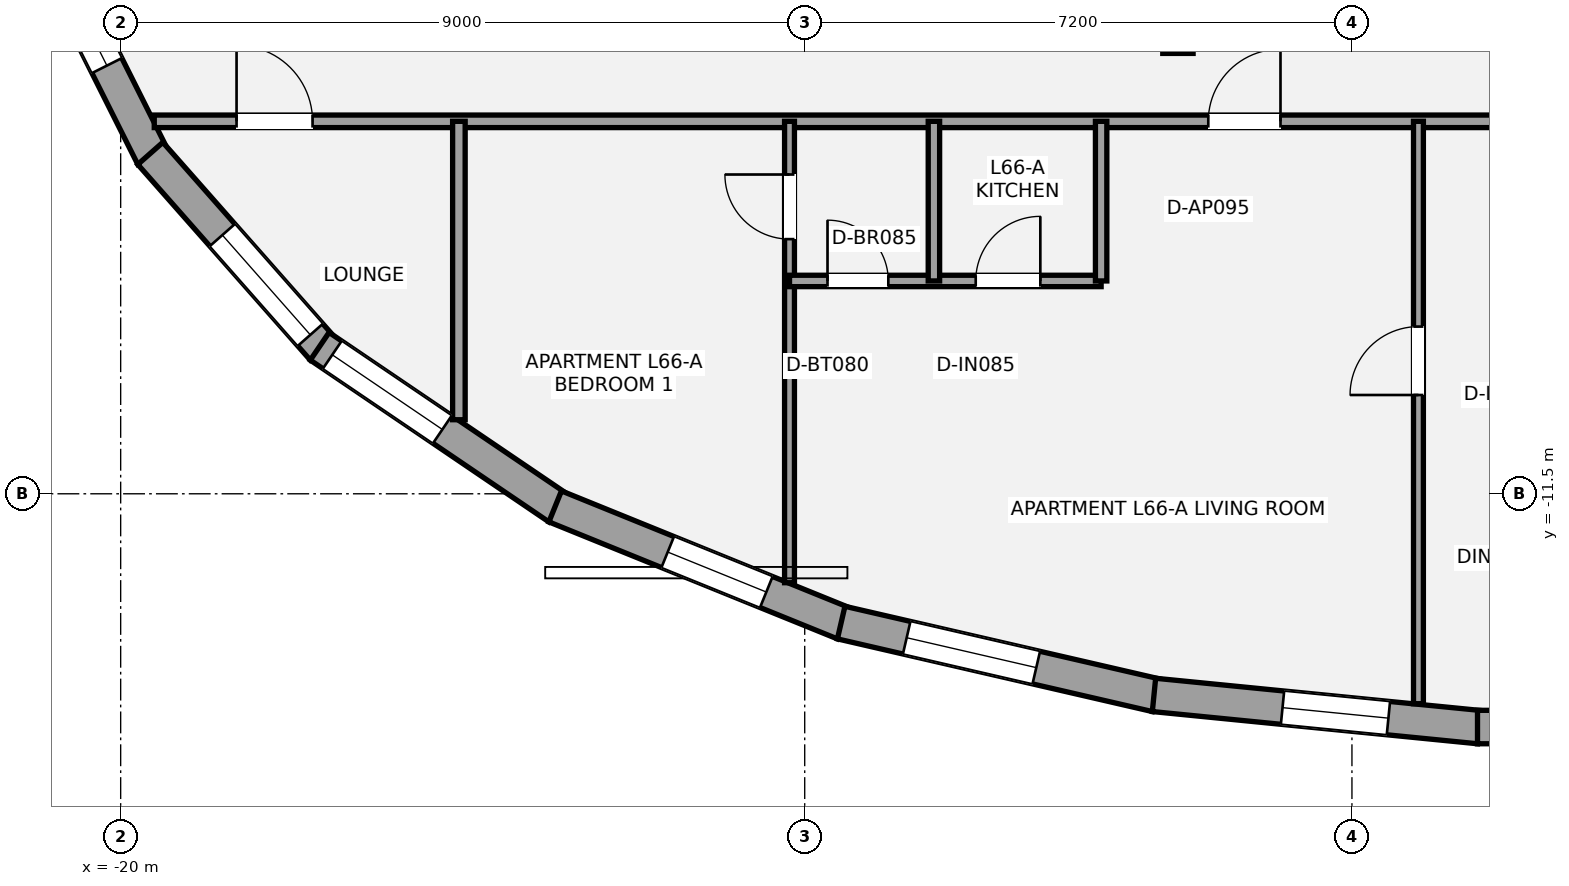
"""IFC4 building model, lengths in metres.
Left out: names, types, materials, properties, quantities, classifications, styles, units other than length and angle.
Written with IfcOpenShell. Run it as: python <this file> out.ifc"""

import sys

from ifc_helpers import new_model, si_unit, direction, frame, frame_2d, origin, origin_2d, place, context, subcontext, project, spatial, rectangle, i_section, extrude, element, fill, save


model = new_model("IFC4")
c1 = context("Model", 3, precision=1e-05, world=origin(), true_north=direction((0.0, 1.0)))
c2 = subcontext(c1, "Body", "Model", "MODEL_VIEW")
j1 = project(units=[si_unit("LENGTHUNIT", "METRE"), si_unit("PLANEANGLEUNIT", "RADIAN")], contexts=[c1])
p1 = place(None, origin())
s1 = spatial("IfcSite", under=j1, at=p1, CompositionType="ELEMENT")
p2 = place(p1, origin())
s2 = spatial("IfcBuilding", under=s1, at=p2, CompositionType="ELEMENT")
p3 = place(p2, frame((0.0, 0.0, 235.2)))
s3 = spatial("IfcBuildingStorey", under=s2, at=p3, CompositionType="ELEMENT", Elevation=235.2)
p4 = place(p3, frame((-6.09, -5.513, 0.0), z_axis=(0.0, 0.0, 1.0), x_axis=(1.0, 0.0, 0.0)))
e1 = element("IfcColumn", 1, at=p4, inside=s3, PredefinedType="COLUMN", context=c2, shape_type="SweptSolid", body=[
    extrude(i_section(OverallWidth=0.399, OverallDepth=0.387, WebThickness=0.021, FlangeThickness=0.033, at=origin_2d()), origin(), (0.0, 0.0, 1.0), 3.15),
])
p5 = place(p3, frame((-19.578, -7.069, 0.0), z_axis=(0.0, 0.0, 1.0), x_axis=(-0.448424724145, 0.893820601002, 0.0)))
e2 = element("IfcWall", 2, at=p5, inside=s3, PredefinedType="STANDARD", context=c2, shape_type="SweptSolid", body=[
    extrude(rectangle(XDim=3.144, YDim=0.44, at=frame_2d((1.572, 0.0))), origin(), (0.0, 0.0, 1.0), 2.336),
])
p6 = place(p5, frame((1.344, 0.0, 0.58)))
e3 = element("IfcOpeningElement", 3, at=p6, cuts=e2, PredefinedType="OPENING", context=c2, shape_type="SweptSolid", body=[
    extrude(rectangle(XDim=1.4, YDim=1.55, at=frame_2d((0.7, 0.775))), frame((0.0, 0.23, 0.0), z_axis=(0.0, -1.0, 0.0), x_axis=(1.0, 0.0, 0.0)), (0.0, 0.0, 1.0), 0.46),
])
p7 = place(p3, frame((-17.34, -9.596, 0.0), z_axis=(0.0, 0.0, 1.0), x_axis=(-0.66136043846, 0.750068243855, 0.0)))
e4 = element("IfcWall", 4, at=p7, inside=s3, PredefinedType="STANDARD", context=c2, shape_type="SweptSolid", body=[
    extrude(rectangle(XDim=3.432, YDim=0.44, at=frame_2d((1.716, 0.0))), origin(), (0.0, 0.0, 1.0), 2.336),
])
p8 = place(p7, frame((0.249, 0.0, 0.55)))
e5 = element("IfcOpeningElement", 5, at=p8, cuts=e4, PredefinedType="OPENING", context=c2, shape_type="SweptSolid", body=[
    extrude(rectangle(XDim=1.75, YDim=1.55, at=frame_2d((0.875, 0.775))), frame((0.0, 0.23, 0.0), z_axis=(0.0, -1.0, 0.0), x_axis=(1.0, 0.0, 0.0)), (0.0, 0.0, 1.0), 0.46),
])
p9 = place(p3, frame((-14.242, -11.688, 0.0), z_axis=(0.0, 0.0, 1.0), x_axis=(-0.827637036896, 0.561263694851, 0.0)))
e6 = element("IfcWall", 6, at=p9, inside=s3, PredefinedType="STANDARD", context=c2, shape_type="SweptSolid", body=[
    extrude(rectangle(XDim=3.793, YDim=0.44, at=frame_2d((1.896, 0.0))), origin(), (0.0, 0.0, 1.0), 2.336),
])
p10 = place(p9, frame((1.843, 0.0, 0.55)))
e7 = element("IfcOpeningElement", 7, at=p10, cuts=e6, PredefinedType="OPENING", context=c2, shape_type="SweptSolid", body=[
    extrude(rectangle(XDim=1.75, YDim=1.55, at=frame_2d((0.875, 0.775))), frame((0.0, 0.23, 0.0), z_axis=(0.0, -1.0, 0.0), x_axis=(1.0, 0.0, 0.0)), (0.0, 0.0, 1.0), 0.46),
])
p11 = place(p3, frame((-10.487, -13.205, 0.0), z_axis=(0.0, 0.0, 1.0), x_axis=(-0.926731976866, 0.375723093586, 0.0)))
e8 = element("IfcWall", 8, at=p11, inside=s3, PredefinedType="STANDARD", context=c2, shape_type="SweptSolid", body=[
    extrude(rectangle(XDim=4.096, YDim=0.44, at=frame_2d((2.048, 0.0))), origin(), (0.0, 0.0, 1.0), 2.336),
])
p12 = place(p11, frame((1.098, 0.0, 0.55)))
e9 = element("IfcOpeningElement", 9, at=p12, cuts=e8, PredefinedType="OPENING", context=c2, shape_type="SweptSolid", body=[
    extrude(rectangle(XDim=1.4, YDim=1.55, at=frame_2d((0.7, 0.775))), frame((0.0, 0.23, 0.0), z_axis=(0.0, -1.0, 0.0), x_axis=(1.0, 0.0, 0.0)), (0.0, 0.0, 1.0), 0.46),
])
p13 = place(p3, frame((-6.377, -14.151, 0.0), z_axis=(0.0, 0.0, 1.0), x_axis=(-0.974398936081, 0.224825962391, 0.0)))
e10 = element("IfcWall", 10, at=p13, inside=s3, PredefinedType="STANDARD", context=c2, shape_type="SweptSolid", body=[
    extrude(rectangle(XDim=4.252, YDim=0.44, at=frame_2d((2.126, 0.0))), origin(), (0.0, 0.0, 1.0), 2.336),
])
p14 = place(p13, frame((1.618, 0.0, 0.55)))
e11 = element("IfcOpeningElement", 11, at=p14, cuts=e10, PredefinedType="OPENING", context=c2, shape_type="SweptSolid", body=[
    extrude(rectangle(XDim=1.75, YDim=1.55, at=frame_2d((0.875, 0.775))), frame((0.0, 0.23, 0.0), z_axis=(0.0, -1.0, 0.0), x_axis=(1.0, 0.0, 0.0)), (0.0, 0.0, 1.0), 0.46),
])
p15 = place(p3, frame((-2.126, -14.57, 0.0), z_axis=(0.0, 0.0, 1.0), x_axis=(-0.995134540264, 0.098525361068, 0.0)))
e12 = element("IfcWall", 12, at=p15, inside=s3, PredefinedType="STANDARD", context=c2, shape_type="SweptSolid", body=[
    extrude(rectangle(XDim=4.299, YDim=0.44, at=frame_2d((2.15, 0.0))), origin(), (0.0, 0.0, 1.0), 2.336),
])
p16 = place(p15, frame((1.2, 0.0, 0.58)))
e13 = element("IfcOpeningElement", 13, at=p16, cuts=e12, PredefinedType="OPENING", context=c2, shape_type="SweptSolid", body=[
    extrude(rectangle(XDim=1.4, YDim=1.55, at=frame_2d((0.7, 0.775))), frame((0.0, 0.23, 0.0), z_axis=(0.0, -1.0, 0.0), x_axis=(1.0, 0.0, 0.0)), (0.0, 0.0, 1.0), 0.46),
])
p17 = place(p3, frame((2.148, -14.569, 0.0), z_axis=(0.0, 0.0, 1.0), x_axis=(-1.0, 0.0, 0.0)))
e14 = element("IfcWall", 14, at=p17, inside=s3, PredefinedType="STANDARD", context=c2, shape_type="SweptSolid", body=[
    extrude(rectangle(XDim=4.296, YDim=0.44, at=frame_2d((2.148, 0.0))), origin(), (0.0, 0.0, 1.0), 2.336),
])
p18 = place(p17, frame((2.546, 0.0, 0.58)))
e15 = element("IfcOpeningElement", 15, at=p18, cuts=e14, PredefinedType="OPENING", context=c2, shape_type="SweptSolid", body=[
    extrude(rectangle(XDim=1.4, YDim=1.55, at=frame_2d((0.7, 0.775))), frame((0.0, 0.23, 0.0), z_axis=(0.0, -1.0, 0.0), x_axis=(1.0, 0.0, 0.0)), (0.0, 0.0, 1.0), 0.46),
])
p19 = place(p17, frame((1.522, 0.0, 0.58)))
e16 = element("IfcOpeningElement", 16, at=p19, cuts=e14, PredefinedType="OPENING", context=c2, shape_type="SweptSolid", body=[
    extrude(rectangle(XDim=0.56, YDim=1.15, at=frame_2d((0.28, 0.575))), frame((0.0, 0.23, 0.0), z_axis=(0.0, -1.0, 0.0), x_axis=(1.0, 0.0, 0.0)), (0.0, 0.0, 1.0), 0.46),
])
p20 = place(p3, frame((-19.558, -6.6, 0.0), z_axis=(0.0, 0.0, 1.0), x_axis=(1.0, 0.0, 0.0)))
e17 = element("IfcWall", 17, at=p20, inside=s3, PredefinedType="PARTITIONING", context=c2, shape_type="SweptSolid", body=[
    extrude(rectangle(XDim=39.116, YDim=0.165, at=frame_2d((19.558, 0.0))), origin(), (0.0, 0.0, 1.0), 2.423),
])
p21 = place(p20, frame((1.083, 0.0, 0.0)))
e18 = element("IfcOpeningElement", 18, at=p21, cuts=e17, PredefinedType="OPENING", context=c2, shape_type="SweptSolid", body=[
    extrude(rectangle(XDim=1.0, YDim=2.15, at=frame_2d((0.5, 1.075))), frame((0.0, 0.093, 0.0), z_axis=(0.0, -1.0, 0.0), x_axis=(1.0, 0.0, 0.0)), (0.0, 0.0, 1.0), 0.185),
])
p22 = place(p20, frame((37.258, 0.0, 0.0)))
e19 = element("IfcOpeningElement", 19, at=p22, cuts=e17, PredefinedType="OPENING", context=c2, shape_type="SweptSolid", body=[
    extrude(rectangle(XDim=1.0, YDim=2.15, at=frame_2d((0.5, 1.075))), frame((0.0, 0.093, 0.0), z_axis=(0.0, -1.0, 0.0), x_axis=(1.0, 0.0, 0.0)), (0.0, 0.0, 1.0), 0.185),
])
p23 = place(p20, frame((13.868, 0.0, 0.0)))
e20 = element("IfcOpeningElement", 20, at=p23, cuts=e17, PredefinedType="OPENING", context=c2, shape_type="SweptSolid", body=[
    extrude(rectangle(XDim=0.95, YDim=2.15, at=frame_2d((0.475, 1.075))), frame((0.0, 0.093, 0.0), z_axis=(0.0, -1.0, 0.0), x_axis=(1.0, 0.0, 0.0)), (0.0, 0.0, 1.0), 0.185),
])
p24 = place(p20, frame((30.658, 0.0, 0.0)))
e21 = element("IfcOpeningElement", 21, at=p24, cuts=e17, PredefinedType="OPENING", context=c2, shape_type="SweptSolid", body=[
    extrude(rectangle(XDim=0.95, YDim=2.15, at=frame_2d((0.475, 1.075))), frame((0.0, 0.093, 0.0), z_axis=(0.0, -1.0, 0.0), x_axis=(1.0, 0.0, 0.0)), (0.0, 0.0, 1.0), 0.185),
])
p25 = place(p3, frame((-15.55, -10.526, 0.0), z_axis=(0.0, 0.0, 1.0), x_axis=(0.0, 1.0, 0.0)))
e22 = element("IfcWall", 22, at=p25, inside=s3, PredefinedType="PARTITIONING", context=c2, shape_type="SweptSolid", body=[
    extrude(rectangle(XDim=3.926, YDim=0.165, at=frame_2d((1.963, 0.0))), origin(), (0.0, 0.0, 1.0), 2.423),
])
p26 = place(p3, frame((-11.2, -12.67, 0.0), z_axis=(0.0, 0.0, 1.0), x_axis=(0.0, 1.0, 0.0)))
e23 = element("IfcWall", 23, at=p26, inside=s3, PredefinedType="PARTITIONING", context=c2, shape_type="SweptSolid", body=[
    extrude(rectangle(XDim=6.07, YDim=0.13, at=frame_2d((3.035, 0.0))), origin(), (0.0, 0.0, 1.0), 2.423),
])
p27 = place(p26, frame((4.521, 0.0, 0.0)))
e24 = element("IfcOpeningElement", 24, at=p27, cuts=e23, PredefinedType="OPENING", context=c2, shape_type="SweptSolid", body=[
    extrude(rectangle(XDim=0.85, YDim=2.1, at=frame_2d((0.425, 1.05))), frame((0.0, 0.075, 0.0), z_axis=(0.0, -1.0, 0.0), x_axis=(1.0, 0.0, 0.0)), (0.0, 0.0, 1.0), 0.15),
])
p28 = place(p3, frame((-11.2, -8.7, 0.0), z_axis=(0.0, 0.0, 1.0), x_axis=(1.0, 0.0, 0.0)))
e25 = element("IfcWall", 25, at=p28, inside=s3, PredefinedType="PLUMBINGWALL", context=c2, shape_type="SweptSolid", body=[
    extrude(rectangle(XDim=4.1, YDim=0.15, at=frame_2d((2.05, 0.0))), origin(), (0.0, 0.0, 1.0), 2.423),
])
p29 = place(p28, frame((0.5, 0.0, 0.0)))
e26 = element("IfcOpeningElement", 26, at=p29, cuts=e25, PredefinedType="OPENING", context=c2, shape_type="SweptSolid", body=[
    extrude(rectangle(XDim=0.8, YDim=2.1, at=frame_2d((0.4, 1.05))), frame((0.0, 0.085, 0.0), z_axis=(0.0, -1.0, 0.0), x_axis=(1.0, 0.0, 0.0)), (0.0, 0.0, 1.0), 0.17),
])
p30 = place(p28, frame((2.45, 0.0, 0.0)))
e27 = element("IfcOpeningElement", 27, at=p30, cuts=e25, PredefinedType="OPENING", context=c2, shape_type="SweptSolid", body=[
    extrude(rectangle(XDim=0.85, YDim=2.1, at=frame_2d((0.425, 1.05))), frame((0.0, 0.085, 0.0), z_axis=(0.0, -1.0, 0.0), x_axis=(1.0, 0.0, 0.0)), (0.0, 0.0, 1.0), 0.17),
])
p31 = place(p3, frame((-9.3, -8.7, 0.0), z_axis=(0.0, 0.0, 1.0), x_axis=(0.0, 1.0, 0.0)))
e28 = element("IfcWall", 28, at=p31, inside=s3, PredefinedType="PLUMBINGWALL", context=c2, shape_type="SweptSolid", body=[
    extrude(rectangle(XDim=2.1, YDim=0.15, at=frame_2d((1.05, 0.0))), origin(), (0.0, 0.0, 1.0), 2.97),
])
p32 = place(p3, frame((-7.1, -8.7, 0.0), z_axis=(0.0, 0.0, 1.0), x_axis=(0.0, 1.0, 0.0)))
e29 = element("IfcWall", 29, at=p32, inside=s3, PredefinedType="PLUMBINGWALL", context=c2, shape_type="SweptSolid", body=[
    extrude(rectangle(XDim=2.1, YDim=0.15, at=frame_2d((1.05, 0.0))), origin(), (0.0, 0.0, 1.0), 2.423),
])
p33 = place(p3, frame((-2.925, -14.262, 0.0), z_axis=(0.0, 0.0, 1.0), x_axis=(0.0, 1.0, 0.0)))
e30 = element("IfcWall", 30, at=p33, inside=s3, PredefinedType="PARTITIONING", context=c2, shape_type="SweptSolid", body=[
    extrude(rectangle(XDim=7.662, YDim=0.13, at=frame_2d((3.831, 0.0))), origin(), (0.0, 0.0, 1.0), 2.423),
])
p34 = place(p33, frame((4.061, 0.0, 0.0)))
e31 = element("IfcOpeningElement", 31, at=p34, cuts=e30, PredefinedType="OPENING", context=c2, shape_type="SweptSolid", body=[
    extrude(rectangle(XDim=0.9, YDim=2.1, at=frame_2d((0.45, 1.05))), frame((0.0, 0.075, 0.0), z_axis=(0.0, -1.0, 0.0), x_axis=(1.0, 0.0, 0.0)), (0.0, 0.0, 1.0), 0.15),
])
p35 = place(p6, origin())
e32 = element("IfcWindow", 32, at=p35, inside=s3, PartitioningType="SINGLE_PANEL", PredefinedType="WINDOW", context=c2, shape_type="SweptSolid", body=[
    extrude(rectangle(XDim=1.4, YDim=1.55, at=frame_2d((0.7, 0.775))), frame((0.0, -0.01, 0.0), z_axis=(0.0, -1.0, 0.0), x_axis=(1.0, 0.0, 0.0)), (0.0, 0.0, 1.0), 0.06),
])
fill(e3, e32)
p36 = place(p8, origin())
e33 = element("IfcWindow", 33, at=p36, inside=s3, PartitioningType="SINGLE_PANEL", PredefinedType="WINDOW", context=c2, shape_type="SweptSolid", body=[
    extrude(rectangle(XDim=1.75, YDim=1.55, at=frame_2d((0.875, 0.775))), frame((0.0, -0.01, 0.0), z_axis=(0.0, -1.0, 0.0), x_axis=(1.0, 0.0, 0.0)), (0.0, 0.0, 1.0), 0.06),
])
fill(e5, e33)
p37 = place(p10, origin())
e34 = element("IfcWindow", 34, at=p37, inside=s3, PartitioningType="SINGLE_PANEL", PredefinedType="WINDOW", context=c2, shape_type="SweptSolid", body=[
    extrude(rectangle(XDim=1.75, YDim=1.55, at=frame_2d((0.875, 0.775))), frame((0.0, -0.01, 0.0), z_axis=(0.0, -1.0, 0.0), x_axis=(1.0, 0.0, 0.0)), (0.0, 0.0, 1.0), 0.06),
])
fill(e7, e34)
p38 = place(p12, origin())
e35 = element("IfcWindow", 35, at=p38, inside=s3, PartitioningType="SINGLE_PANEL", PredefinedType="WINDOW", context=c2, shape_type="SweptSolid", body=[
    extrude(rectangle(XDim=1.4, YDim=1.55, at=frame_2d((0.7, 0.775))), frame((0.0, -0.01, 0.0), z_axis=(0.0, -1.0, 0.0), x_axis=(1.0, 0.0, 0.0)), (0.0, 0.0, 1.0), 0.06),
])
fill(e9, e35)
p39 = place(p14, origin())
e36 = element("IfcWindow", 36, at=p39, inside=s3, PartitioningType="SINGLE_PANEL", PredefinedType="WINDOW", context=c2, shape_type="SweptSolid", body=[
    extrude(rectangle(XDim=1.75, YDim=1.55, at=frame_2d((0.875, 0.775))), frame((0.0, -0.01, 0.0), z_axis=(0.0, -1.0, 0.0), x_axis=(1.0, 0.0, 0.0)), (0.0, 0.0, 1.0), 0.06),
])
fill(e11, e36)
p40 = place(p16, origin())
e37 = element("IfcWindow", 37, at=p40, inside=s3, PartitioningType="SINGLE_PANEL", PredefinedType="WINDOW", context=c2, shape_type="SweptSolid", body=[
    extrude(rectangle(XDim=1.4, YDim=1.55, at=frame_2d((0.7, 0.775))), frame((0.0, -0.01, 0.0), z_axis=(0.0, -1.0, 0.0), x_axis=(1.0, 0.0, 0.0)), (0.0, 0.0, 1.0), 0.06),
])
fill(e13, e37)
p41 = place(p21, origin())
e38 = element("IfcDoor", 38, at=p41, inside=s3, OperationType="SINGLE_SWING_LEFT", PredefinedType="DOOR", context=c2, shape_type="SweptSolid", body=[
    extrude(rectangle(XDim=1.0, YDim=2.15, at=frame_2d((0.5, 1.075))), frame((0.0, 0.025, 0.0), z_axis=(0.0, -1.0, 0.0), x_axis=(1.0, 0.0, 0.0)), (0.0, 0.0, 1.0), 0.05),
])
fill(e18, e38)
p42 = place(p27, origin())
e39 = element("IfcDoor", 39, at=p42, inside=s3, OperationType="SINGLE_SWING_RIGHT", PredefinedType="DOOR", context=c2, shape_type="SweptSolid", body=[
    extrude(rectangle(XDim=0.85, YDim=2.1, at=frame_2d((0.425, 1.05))), frame((0.0, 0.025, 0.0), z_axis=(0.0, -1.0, 0.0), x_axis=(1.0, 0.0, 0.0)), (0.0, 0.0, 1.0), 0.05),
])
fill(e24, e39)
p43 = place(p29, origin())
e40 = element("IfcDoor", 40, at=p43, inside=s3, OperationType="SINGLE_SWING_LEFT", PredefinedType="DOOR", context=c2, shape_type="SweptSolid", body=[
    extrude(rectangle(XDim=0.8, YDim=2.1, at=frame_2d((0.4, 1.05))), frame((0.0, 0.025, 0.0), z_axis=(0.0, -1.0, 0.0), x_axis=(1.0, 0.0, 0.0)), (0.0, 0.0, 1.0), 0.05),
])
fill(e26, e40)
p44 = place(p30, origin())
e41 = element("IfcDoor", 41, at=p44, inside=s3, OperationType="SINGLE_SWING_RIGHT", PredefinedType="DOOR", context=c2, shape_type="SweptSolid", body=[
    extrude(rectangle(XDim=0.85, YDim=2.1, at=frame_2d((0.425, 1.05))), frame((0.0, 0.025, 0.0), z_axis=(0.0, -1.0, 0.0), x_axis=(1.0, 0.0, 0.0)), (0.0, 0.0, 1.0), 0.05),
])
fill(e27, e41)
p45 = place(p23, origin())
e42 = element("IfcDoor", 42, at=p45, inside=s3, OperationType="SINGLE_SWING_RIGHT", PredefinedType="DOOR", context=c2, shape_type="SweptSolid", body=[
    extrude(rectangle(XDim=0.95, YDim=2.15, at=frame_2d((0.475, 1.075))), frame((0.0, 0.025, 0.0), z_axis=(0.0, -1.0, 0.0), x_axis=(1.0, 0.0, 0.0)), (0.0, 0.0, 1.0), 0.05),
])
fill(e20, e42)
p46 = place(p34, origin())
e43 = element("IfcDoor", 43, at=p46, inside=s3, OperationType="SINGLE_SWING_LEFT", PredefinedType="DOOR", context=c2, shape_type="SweptSolid", body=[
    extrude(rectangle(XDim=0.9, YDim=2.1, at=frame_2d((0.45, 1.05))), frame((0.0, 0.025, 0.0), z_axis=(0.0, -1.0, 0.0), x_axis=(1.0, 0.0, 0.0)), (0.0, 0.0, 1.0), 0.05),
])
fill(e31, e43)
save(model, sys.argv[1])
